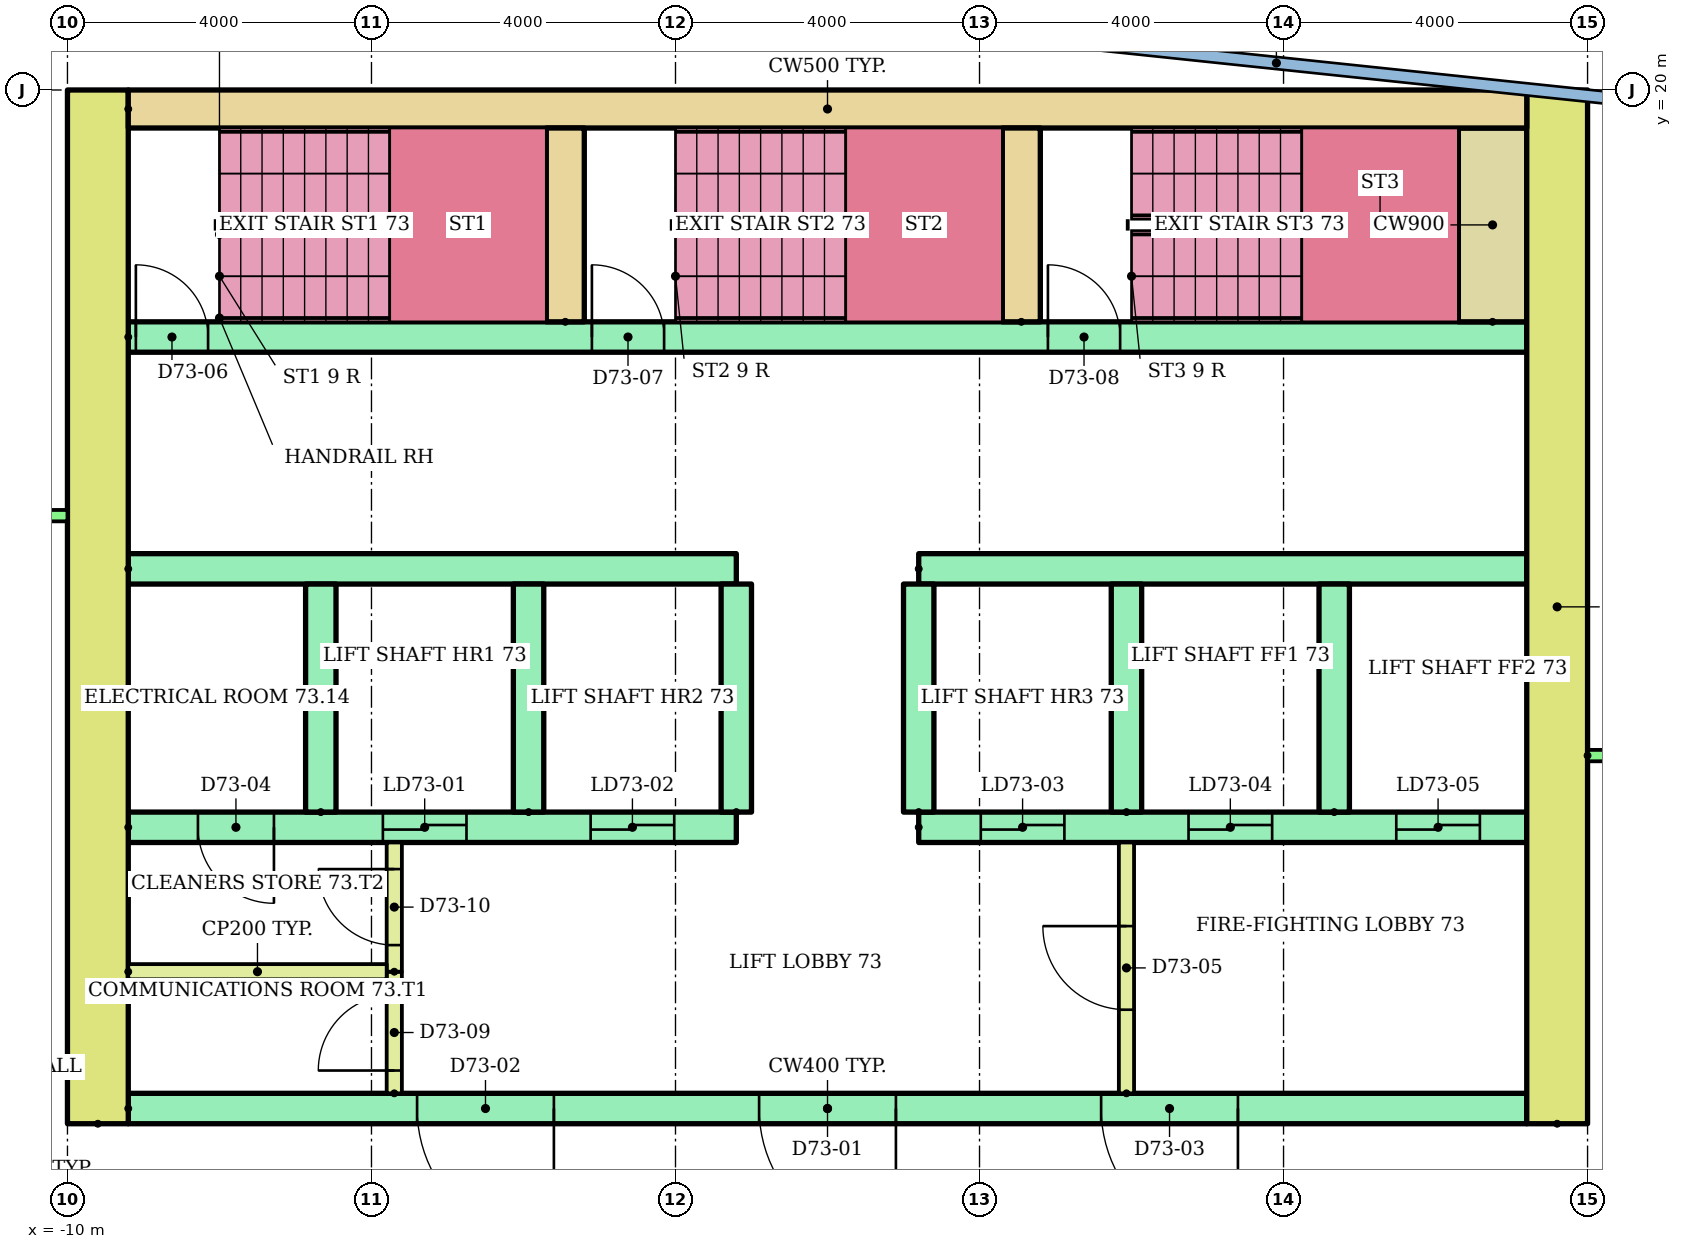
"""IFC4 building model, lengths in metres.
Left out: names, types, materials, properties, quantities, classifications, styles, units other than length and angle.
Written with IfcOpenShell. Run it as: python <this file> out.ifc"""

import sys

from ifc_helpers import new_model, si_unit, direction, frame, frame_2d, origin, place, context, subcontext, project, spatial, rectangle, extrude, element, fill, save


model = new_model("IFC4")
c1 = context("Model", 3, precision=1e-05, world=origin(), true_north=direction((0.0, 1.0)))
c2 = subcontext(c1, "Body", "Model", "MODEL_VIEW")
j1 = project(units=[si_unit("LENGTHUNIT", "METRE"), si_unit("PLANEANGLEUNIT", "RADIAN")], contexts=[c1])
p1 = place(None, origin())
s1 = spatial("IfcSite", under=j1, at=p1, CompositionType="ELEMENT")
p2 = place(p1, origin())
s2 = spatial("IfcBuilding", under=s1, at=p2, CompositionType="ELEMENT")
p3 = place(p2, frame((0.0, 0.0, 278.7)))
s3 = spatial("IfcBuildingStorey", under=s2, at=p3, CompositionType="ELEMENT", Elevation=278.7)
for number, where, z_axis, x_axis in (
    (1, (-9.6, 6.4, 0.0), (0.0, 0.0, 1.0), (0.0, 1.0, 0.0)),
    (2, (9.6, 6.4, 0.0), (0.0, 0.0, 1.0), (0.0, 1.0, 0.0)),
):
    element("IfcWall", number, at=place(p3, frame(where, z_axis=z_axis, x_axis=x_axis)), inside=s3, PredefinedType="SHEAR", context=c2, shape_type="SweptSolid", body=[
        extrude(rectangle(XDim=13.6, YDim=0.8, at=frame_2d((6.8, 0.0))), origin(), (0.0, 0.0, 1.0), 2.8),
    ])
p4 = place(p3, frame((-9.2, 19.75, 0.0)))
e3 = element("IfcWall", 3, at=p4, inside=s3, PredefinedType="SHEAR", context=c2, shape_type="SweptSolid", body=[
    extrude(rectangle(XDim=18.4, YDim=0.5, at=frame_2d((9.2, 0.0))), origin(), (0.0, 0.0, 1.0), 2.8),
])
p5 = place(p3, frame((-9.2, 6.6, 0.0)))
e4 = element("IfcWall", 4, at=p5, inside=s3, PredefinedType="SHEAR", context=c2, shape_type="SweptSolid", body=[
    extrude(rectangle(XDim=18.4, YDim=0.4, at=frame_2d((9.2, 0.0))), origin(), (0.0, 0.0, 1.0), 2.8),
])
p6 = place(p5, frame((8.3, 0.0, 0.0)))
e5 = element("IfcOpeningElement", 5, at=p6, cuts=e4, PredefinedType="OPENING", context=c2, shape_type="SweptSolid", body=[
    extrude(rectangle(XDim=1.8, YDim=2.1, at=frame_2d((0.9, 1.05))), frame((0.0, 0.21, 0.0), z_axis=(0.0, -1.0, 0.0), x_axis=(1.0, 0.0, 0.0)), (0.0, 0.0, 1.0), 0.42),
])
p7 = place(p5, frame((3.8, 0.0, 0.0)))
e6 = element("IfcOpeningElement", 6, at=p7, cuts=e4, PredefinedType="OPENING", context=c2, shape_type="SweptSolid", body=[
    extrude(rectangle(XDim=1.8, YDim=2.1, at=frame_2d((0.9, 1.05))), frame((0.0, 0.21, 0.0), z_axis=(0.0, -1.0, 0.0), x_axis=(1.0, 0.0, 0.0)), (0.0, 0.0, 1.0), 0.42),
])
p8 = place(p5, frame((12.8, 0.0, 0.0)))
e7 = element("IfcOpeningElement", 7, at=p8, cuts=e4, PredefinedType="OPENING", context=c2, shape_type="SweptSolid", body=[
    extrude(rectangle(XDim=1.8, YDim=2.1, at=frame_2d((0.9, 1.05))), frame((0.0, 0.21, 0.0), z_axis=(0.0, -1.0, 0.0), x_axis=(1.0, 0.0, 0.0)), (0.0, 0.0, 1.0), 0.42),
])
p9 = place(p3, frame((-9.2, 10.3, 0.0)))
e8 = element("IfcWall", 8, at=p9, inside=s3, PredefinedType="SHEAR", context=c2, shape_type="SweptSolid", body=[
    extrude(rectangle(XDim=8.0, YDim=0.4, at=frame_2d((4.0, 0.0))), origin(), (0.0, 0.0, 1.0), 2.8),
])
p10 = place(p9, frame((3.35, 0.0, 0.0)))
e9 = element("IfcOpeningElement", 9, at=p10, cuts=e8, PredefinedType="OPENING", context=c2, shape_type="SweptSolid", body=[
    extrude(rectangle(XDim=1.1, YDim=2.1, at=frame_2d((0.55, 1.05))), frame((0.0, 0.21, 0.0), z_axis=(0.0, -1.0, 0.0), x_axis=(1.0, 0.0, 0.0)), (0.0, 0.0, 1.0), 0.42),
])
p11 = place(p9, frame((6.083, 0.0, 0.0)))
e10 = element("IfcOpeningElement", 10, at=p11, cuts=e8, PredefinedType="OPENING", context=c2, shape_type="SweptSolid", body=[
    extrude(rectangle(XDim=1.1, YDim=2.1, at=frame_2d((0.55, 1.05))), frame((0.0, 0.21, 0.0), z_axis=(0.0, -1.0, 0.0), x_axis=(1.0, 0.0, 0.0)), (0.0, 0.0, 1.0), 0.42),
])
p12 = place(p9, frame((0.917, 0.0, 0.0)))
e11 = element("IfcOpeningElement", 11, at=p12, cuts=e8, PredefinedType="OPENING", context=c2, shape_type="SweptSolid", body=[
    extrude(rectangle(XDim=1.0, YDim=2.1, at=frame_2d((0.5, 1.05))), frame((0.0, 0.21, 0.0), z_axis=(0.0, -1.0, 0.0), x_axis=(1.0, 0.0, 0.0)), (0.0, 0.0, 1.0), 0.42),
])
p13 = place(p3, frame((-9.2, 13.7, 0.0)))
e12 = element("IfcWall", 12, at=p13, inside=s3, PredefinedType="SHEAR", context=c2, shape_type="SweptSolid", body=[
    extrude(rectangle(XDim=8.0, YDim=0.4, at=frame_2d((4.0, 0.0))), origin(), (0.0, 0.0, 1.0), 2.8),
])
p14 = place(p3, frame((1.2, 10.3, 0.0)))
e13 = element("IfcWall", 13, at=p14, inside=s3, PredefinedType="SHEAR", context=c2, shape_type="SweptSolid", body=[
    extrude(rectangle(XDim=8.0, YDim=0.4, at=frame_2d((4.0, 0.0))), origin(), (0.0, 0.0, 1.0), 2.8),
])
p15 = place(p14, frame((0.817, 0.0, 0.0)))
e14 = element("IfcOpeningElement", 14, at=p15, cuts=e13, PredefinedType="OPENING", context=c2, shape_type="SweptSolid", body=[
    extrude(rectangle(XDim=1.1, YDim=2.1, at=frame_2d((0.55, 1.05))), frame((0.0, 0.21, 0.0), z_axis=(0.0, -1.0, 0.0), x_axis=(1.0, 0.0, 0.0)), (0.0, 0.0, 1.0), 0.42),
])
p16 = place(p14, frame((3.55, 0.0, 0.0)))
e15 = element("IfcOpeningElement", 15, at=p16, cuts=e13, PredefinedType="OPENING", context=c2, shape_type="SweptSolid", body=[
    extrude(rectangle(XDim=1.1, YDim=2.1, at=frame_2d((0.55, 1.05))), frame((0.0, 0.21, 0.0), z_axis=(0.0, -1.0, 0.0), x_axis=(1.0, 0.0, 0.0)), (0.0, 0.0, 1.0), 0.42),
])
p17 = place(p14, frame((6.283, 0.0, 0.0)))
e16 = element("IfcOpeningElement", 16, at=p17, cuts=e13, PredefinedType="OPENING", context=c2, shape_type="SweptSolid", body=[
    extrude(rectangle(XDim=1.1, YDim=2.1, at=frame_2d((0.55, 1.05))), frame((0.0, 0.21, 0.0), z_axis=(0.0, -1.0, 0.0), x_axis=(1.0, 0.0, 0.0)), (0.0, 0.0, 1.0), 0.42),
])
p18 = place(p3, frame((1.2, 13.7, 0.0)))
e17 = element("IfcWall", 17, at=p18, inside=s3, PredefinedType="SHEAR", context=c2, shape_type="SweptSolid", body=[
    extrude(rectangle(XDim=8.0, YDim=0.4, at=frame_2d((4.0, 0.0))), origin(), (0.0, 0.0, 1.0), 2.8),
])
for number, where, z_axis, x_axis in (
    (18, (-6.667, 10.5, 0.0), (0.0, 0.0, 1.0), (0.0, 1.0, 0.0)),
    (19, (-3.933, 10.5, 0.0), (0.0, 0.0, 1.0), (0.0, 1.0, 0.0)),
    (20, (-1.2, 10.5, 0.0), (0.0, 0.0, 1.0), (0.0, 1.0, 0.0)),
    (21, (1.2, 10.5, 0.0), (0.0, 0.0, 1.0), (0.0, 1.0, 0.0)),
    (22, (3.933, 10.5, 0.0), (0.0, 0.0, 1.0), (0.0, 1.0, 0.0)),
    (23, (6.667, 10.5, 0.0), (0.0, 0.0, 1.0), (0.0, 1.0, 0.0)),
):
    element("IfcWall", number, at=place(p3, frame(where, z_axis=z_axis, x_axis=x_axis)), inside=s3, PredefinedType="SHEAR", context=c2, shape_type="SweptSolid", body=[
        extrude(rectangle(XDim=3.0, YDim=0.4, at=frame_2d((1.5, 0.0))), origin(), (0.0, 0.0, 1.0), 2.8),
    ])
p19 = place(p3, frame((3.933, 6.8, 0.0), z_axis=(0.0, 0.0, 1.0), x_axis=(0.0, 1.0, 0.0)))
e24 = element("IfcWall", 24, at=p19, inside=s3, PredefinedType="PARTITIONING", context=c2, shape_type="SweptSolid", body=[
    extrude(rectangle(XDim=3.3, YDim=0.2, at=frame_2d((1.65, 0.0))), origin(), (0.0, 0.0, 1.0), 2.8),
])
p20 = place(p19, frame((1.1, 0.0, 0.0)))
e25 = element("IfcOpeningElement", 25, at=p20, cuts=e24, PredefinedType="OPENING", context=c2, shape_type="SweptSolid", body=[
    extrude(rectangle(XDim=1.1, YDim=2.1, at=frame_2d((0.55, 1.05))), frame((0.0, 0.11, 0.0), z_axis=(0.0, -1.0, 0.0), x_axis=(1.0, 0.0, 0.0)), (0.0, 0.0, 1.0), 0.22),
])
p21 = place(p3, frame((-9.2, 16.75, 0.0)))
e26 = element("IfcWall", 26, at=p21, inside=s3, PredefinedType="SHEAR", context=c2, shape_type="SweptSolid", body=[
    extrude(rectangle(XDim=18.4, YDim=0.4, at=frame_2d((9.2, 0.0))), origin(), (0.0, 0.0, 1.0), 2.8),
])
p22 = place(p21, frame((0.1, 0.0, 0.0)))
e27 = element("IfcOpeningElement", 27, at=p22, cuts=e26, PredefinedType="OPENING", context=c2, shape_type="SweptSolid", body=[
    extrude(rectangle(XDim=0.95, YDim=2.1, at=frame_2d((0.475, 1.05))), frame((0.0, 0.21, 0.0), z_axis=(0.0, -1.0, 0.0), x_axis=(1.0, 0.0, 0.0)), (0.0, 0.0, 1.0), 0.42),
])
p23 = place(p21, frame((6.1, 0.0, 0.0)))
e28 = element("IfcOpeningElement", 28, at=p23, cuts=e26, PredefinedType="OPENING", context=c2, shape_type="SweptSolid", body=[
    extrude(rectangle(XDim=0.95, YDim=2.1, at=frame_2d((0.475, 1.05))), frame((0.0, 0.21, 0.0), z_axis=(0.0, -1.0, 0.0), x_axis=(1.0, 0.0, 0.0)), (0.0, 0.0, 1.0), 0.42),
])
p24 = place(p21, frame((12.1, 0.0, 0.0)))
e29 = element("IfcOpeningElement", 29, at=p24, cuts=e26, PredefinedType="OPENING", context=c2, shape_type="SweptSolid", body=[
    extrude(rectangle(XDim=0.95, YDim=2.1, at=frame_2d((0.475, 1.05))), frame((0.0, 0.21, 0.0), z_axis=(0.0, -1.0, 0.0), x_axis=(1.0, 0.0, 0.0)), (0.0, 0.0, 1.0), 0.42),
])
for number, where, z_axis, x_axis in (
    (30, (-3.45, 16.95, 0.0), (0.0, 0.0, 1.0), (0.0, 1.0, 0.0)),
    (31, (2.55, 16.95, 0.0), (0.0, 0.0, 1.0), (0.0, 1.0, 0.0)),
):
    element("IfcWall", number, at=place(p3, frame(where, z_axis=z_axis, x_axis=x_axis)), inside=s3, PredefinedType="SHEAR", context=c2, shape_type="SweptSolid", body=[
        extrude(rectangle(XDim=2.55, YDim=0.5, at=frame_2d((1.275, 0.0))), origin(), (0.0, 0.0, 1.0), 2.8),
    ])
p25 = place(p3, frame((8.75, 16.95, 0.0), z_axis=(0.0, 0.0, 1.0), x_axis=(0.0, 1.0, 0.0)))
e32 = element("IfcWall", 32, at=p25, inside=s3, PredefinedType="SHEAR", context=c2, shape_type="SweptSolid", body=[
    extrude(rectangle(XDim=2.55, YDim=0.9, at=frame_2d((1.275, 0.0))), origin(), (0.0, 0.0, 1.0), 2.8),
])
p26 = place(p3, frame((-5.7, 6.8, 0.0), z_axis=(0.0, 0.0, 1.0), x_axis=(0.0, 1.0, 0.0)))
e33 = element("IfcWall", 33, at=p26, inside=s3, PredefinedType="PARTITIONING", context=c2, shape_type="SweptSolid", body=[
    extrude(rectangle(XDim=1.6, YDim=0.2, at=frame_2d((0.8, 0.0))), origin(), (0.0, 0.0, 1.0), 2.8),
])
p27 = place(p26, frame((0.3, 0.0, 0.0)))
e34 = element("IfcOpeningElement", 34, at=p27, cuts=e33, PredefinedType="OPENING", context=c2, shape_type="SweptSolid", body=[
    extrude(rectangle(XDim=1.0, YDim=2.1, at=frame_2d((0.5, 1.05))), frame((0.0, 0.11, 0.0), z_axis=(0.0, -1.0, 0.0), x_axis=(1.0, 0.0, 0.0)), (0.0, 0.0, 1.0), 0.22),
])
p28 = place(p3, frame((-5.7, 8.4, 0.0), z_axis=(0.0, 0.0, 1.0), x_axis=(0.0, 1.0, 0.0)))
e35 = element("IfcWall", 35, at=p28, inside=s3, PredefinedType="PARTITIONING", context=c2, shape_type="SweptSolid", body=[
    extrude(rectangle(XDim=1.7, YDim=0.2, at=frame_2d((0.85, 0.0))), origin(), (0.0, 0.0, 1.0), 2.8),
])
p29 = place(p28, frame((0.35, 0.0, 0.0)))
e36 = element("IfcOpeningElement", 36, at=p29, cuts=e35, PredefinedType="OPENING", context=c2, shape_type="SweptSolid", body=[
    extrude(rectangle(XDim=1.0, YDim=2.1, at=frame_2d((0.5, 1.05))), frame((0.0, 0.11, 0.0), z_axis=(0.0, -1.0, 0.0), x_axis=(1.0, 0.0, 0.0)), (0.0, 0.0, 1.0), 0.22),
])
p30 = place(p3, frame((-9.2, 8.4, 0.0)))
e37 = element("IfcWall", 37, at=p30, inside=s3, PredefinedType="PARTITIONING", context=c2, shape_type="SweptSolid", body=[
    extrude(rectangle(XDim=3.4, YDim=0.2, at=frame_2d((1.7, 0.0))), origin(), (0.0, 0.0, 1.0), 2.8),
])
p31 = place(p3, frame((-21.89, 14.4, 0.0)))
e38 = element("IfcWall", 38, at=p31, inside=s3, PredefinedType="PARTITIONING", context=c2, shape_type="SweptSolid", body=[
    extrude(rectangle(XDim=11.89, YDim=0.15, at=frame_2d((5.945, 0.0))), origin(), (0.0, 0.0, 1.0), 2.4),
])
p32 = place(p31, frame((1.26, 0.0, 0.0)))
e39 = element("IfcOpeningElement", 39, at=p32, cuts=e38, PredefinedType="OPENING", context=c2, shape_type="SweptSolid", body=[
    extrude(rectangle(XDim=1.0, YDim=2.1, at=frame_2d((0.5, 1.05))), frame((0.0, 0.085, 0.0), z_axis=(0.0, -1.0, 0.0), x_axis=(1.0, 0.0, 0.0)), (0.0, 0.0, 1.0), 0.17),
])
p33 = place(p31, frame((8.254, 0.0, 0.0)))
e40 = element("IfcOpeningElement", 40, at=p33, cuts=e38, PredefinedType="OPENING", context=c2, shape_type="SweptSolid", body=[
    extrude(rectangle(XDim=1.0, YDim=2.1, at=frame_2d((0.5, 1.05))), frame((0.0, 0.085, 0.0), z_axis=(0.0, -1.0, 0.0), x_axis=(1.0, 0.0, 0.0)), (0.0, 0.0, 1.0), 0.17),
])
p34 = place(p3, frame((10.0, 11.243, 0.0)))
e41 = element("IfcWall", 41, at=p34, inside=s3, PredefinedType="PARTITIONING", context=c2, shape_type="SweptSolid", body=[
    extrude(rectangle(XDim=22.118, YDim=0.15, at=frame_2d((11.059, 0.0))), origin(), (0.0, 0.0, 1.0), 2.4),
])
p35 = place(p34, frame((7.398, 0.0, 0.0)))
e42 = element("IfcOpeningElement", 42, at=p35, cuts=e41, PredefinedType="OPENING", context=c2, shape_type="SweptSolid", body=[
    extrude(rectangle(XDim=1.0, YDim=2.1, at=frame_2d((0.5, 1.05))), frame((0.0, 0.085, 0.0), z_axis=(0.0, -1.0, 0.0), x_axis=(1.0, 0.0, 0.0)), (0.0, 0.0, 1.0), 0.17),
])
p36 = place(p34, frame((18.477, 0.0, 0.0)))
e43 = element("IfcOpeningElement", 43, at=p36, cuts=e41, PredefinedType="OPENING", context=c2, shape_type="SweptSolid", body=[
    extrude(rectangle(XDim=0.9, YDim=2.1, at=frame_2d((0.45, 1.05))), frame((0.0, 0.085, 0.0), z_axis=(0.0, -1.0, 0.0), x_axis=(1.0, 0.0, 0.0)), (0.0, 0.0, 1.0), 0.17),
])
p37 = place(p6, frame((1.8, 0.0, 0.0), z_axis=(0.0, 0.0, 1.0), x_axis=(-1.0, 0.0, 0.0)))
e44 = element("IfcDoor", 44, at=p37, inside=s3, OperationType="DOUBLE_DOOR_SINGLE_SWING", PredefinedType="DOOR", context=c2, shape_type="SweptSolid", body=[
    extrude(rectangle(XDim=1.8, YDim=2.1, at=frame_2d((0.9, 1.05))), frame((0.0, 0.025, 0.0), z_axis=(0.0, -1.0, 0.0), x_axis=(1.0, 0.0, 0.0)), (0.0, 0.0, 1.0), 0.05),
])
fill(e5, e44)
p38 = place(p7, frame((1.8, 0.0, 0.0), z_axis=(0.0, 0.0, 1.0), x_axis=(-1.0, 0.0, 0.0)))
e45 = element("IfcDoor", 45, at=p38, inside=s3, OperationType="DOUBLE_DOOR_SINGLE_SWING", PredefinedType="DOOR", context=c2, shape_type="SweptSolid", body=[
    extrude(rectangle(XDim=1.8, YDim=2.1, at=frame_2d((0.9, 1.05))), frame((0.0, 0.025, 0.0), z_axis=(0.0, -1.0, 0.0), x_axis=(1.0, 0.0, 0.0)), (0.0, 0.0, 1.0), 0.05),
])
fill(e6, e45)
p39 = place(p8, frame((1.8, 0.0, 0.0), z_axis=(0.0, 0.0, 1.0), x_axis=(-1.0, 0.0, 0.0)))
e46 = element("IfcDoor", 46, at=p39, inside=s3, OperationType="DOUBLE_DOOR_SINGLE_SWING", PredefinedType="DOOR", context=c2, shape_type="SweptSolid", body=[
    extrude(rectangle(XDim=1.8, YDim=2.1, at=frame_2d((0.9, 1.05))), frame((0.0, 0.025, 0.0), z_axis=(0.0, -1.0, 0.0), x_axis=(1.0, 0.0, 0.0)), (0.0, 0.0, 1.0), 0.05),
])
fill(e7, e46)
p40 = place(p10, origin())
e47 = element("IfcDoor", 47, at=p40, inside=s3, OperationType="SLIDING_TO_LEFT", PredefinedType="DOOR", context=c2, shape_type="SweptSolid", body=[
    extrude(rectangle(XDim=1.1, YDim=2.1, at=frame_2d((0.55, 1.05))), frame((0.0, 0.025, 0.0), z_axis=(0.0, -1.0, 0.0), x_axis=(1.0, 0.0, 0.0)), (0.0, 0.0, 1.0), 0.05),
])
fill(e9, e47)
p41 = place(p11, origin())
e48 = element("IfcDoor", 48, at=p41, inside=s3, OperationType="SLIDING_TO_LEFT", PredefinedType="DOOR", context=c2, shape_type="SweptSolid", body=[
    extrude(rectangle(XDim=1.1, YDim=2.1, at=frame_2d((0.55, 1.05))), frame((0.0, 0.025, 0.0), z_axis=(0.0, -1.0, 0.0), x_axis=(1.0, 0.0, 0.0)), (0.0, 0.0, 1.0), 0.05),
])
fill(e10, e48)
p42 = place(p15, origin())
e49 = element("IfcDoor", 49, at=p42, inside=s3, OperationType="SLIDING_TO_LEFT", PredefinedType="DOOR", context=c2, shape_type="SweptSolid", body=[
    extrude(rectangle(XDim=1.1, YDim=2.1, at=frame_2d((0.55, 1.05))), frame((0.0, 0.025, 0.0), z_axis=(0.0, -1.0, 0.0), x_axis=(1.0, 0.0, 0.0)), (0.0, 0.0, 1.0), 0.05),
])
fill(e14, e49)
p43 = place(p16, origin())
e50 = element("IfcDoor", 50, at=p43, inside=s3, OperationType="SLIDING_TO_LEFT", PredefinedType="DOOR", context=c2, shape_type="SweptSolid", body=[
    extrude(rectangle(XDim=1.1, YDim=2.1, at=frame_2d((0.55, 1.05))), frame((0.0, 0.025, 0.0), z_axis=(0.0, -1.0, 0.0), x_axis=(1.0, 0.0, 0.0)), (0.0, 0.0, 1.0), 0.05),
])
fill(e15, e50)
p44 = place(p17, origin())
e51 = element("IfcDoor", 51, at=p44, inside=s3, OperationType="SLIDING_TO_LEFT", PredefinedType="DOOR", context=c2, shape_type="SweptSolid", body=[
    extrude(rectangle(XDim=1.1, YDim=2.1, at=frame_2d((0.55, 1.05))), frame((0.0, 0.025, 0.0), z_axis=(0.0, -1.0, 0.0), x_axis=(1.0, 0.0, 0.0)), (0.0, 0.0, 1.0), 0.05),
])
fill(e16, e51)
p45 = place(p12, frame((1.0, 0.0, 0.0), z_axis=(0.0, 0.0, 1.0), x_axis=(-1.0, 0.0, 0.0)))
e52 = element("IfcDoor", 52, at=p45, inside=s3, OperationType="SINGLE_SWING_RIGHT", PredefinedType="DOOR", context=c2, shape_type="SweptSolid", body=[
    extrude(rectangle(XDim=1.0, YDim=2.1, at=frame_2d((0.5, 1.05))), frame((0.0, 0.025, 0.0), z_axis=(0.0, -1.0, 0.0), x_axis=(1.0, 0.0, 0.0)), (0.0, 0.0, 1.0), 0.05),
])
fill(e11, e52)
p46 = place(p20, origin())
e53 = element("IfcDoor", 53, at=p46, inside=s3, OperationType="SINGLE_SWING_RIGHT", PredefinedType="DOOR", context=c2, shape_type="SweptSolid", body=[
    extrude(rectangle(XDim=1.1, YDim=2.1, at=frame_2d((0.55, 1.05))), frame((0.0, 0.025, 0.0), z_axis=(0.0, -1.0, 0.0), x_axis=(1.0, 0.0, 0.0)), (0.0, 0.0, 1.0), 0.05),
])
fill(e25, e53)
p47 = place(p22, origin())
e54 = element("IfcDoor", 54, at=p47, inside=s3, OperationType="SINGLE_SWING_LEFT", PredefinedType="DOOR", context=c2, shape_type="SweptSolid", body=[
    extrude(rectangle(XDim=0.95, YDim=2.1, at=frame_2d((0.475, 1.05))), frame((0.0, 0.025, 0.0), z_axis=(0.0, -1.0, 0.0), x_axis=(1.0, 0.0, 0.0)), (0.0, 0.0, 1.0), 0.05),
])
fill(e27, e54)
p48 = place(p23, origin())
e55 = element("IfcDoor", 55, at=p48, inside=s3, OperationType="SINGLE_SWING_LEFT", PredefinedType="DOOR", context=c2, shape_type="SweptSolid", body=[
    extrude(rectangle(XDim=0.95, YDim=2.1, at=frame_2d((0.475, 1.05))), frame((0.0, 0.025, 0.0), z_axis=(0.0, -1.0, 0.0), x_axis=(1.0, 0.0, 0.0)), (0.0, 0.0, 1.0), 0.05),
])
fill(e28, e55)
p49 = place(p24, origin())
e56 = element("IfcDoor", 56, at=p49, inside=s3, OperationType="SINGLE_SWING_LEFT", PredefinedType="DOOR", context=c2, shape_type="SweptSolid", body=[
    extrude(rectangle(XDim=0.95, YDim=2.1, at=frame_2d((0.475, 1.05))), frame((0.0, 0.025, 0.0), z_axis=(0.0, -1.0, 0.0), x_axis=(1.0, 0.0, 0.0)), (0.0, 0.0, 1.0), 0.05),
])
fill(e29, e56)
p50 = place(p27, origin())
e57 = element("IfcDoor", 57, at=p50, inside=s3, OperationType="SINGLE_SWING_LEFT", PredefinedType="DOOR", context=c2, shape_type="SweptSolid", body=[
    extrude(rectangle(XDim=1.0, YDim=2.1, at=frame_2d((0.5, 1.05))), frame((0.0, 0.025, 0.0), z_axis=(0.0, -1.0, 0.0), x_axis=(1.0, 0.0, 0.0)), (0.0, 0.0, 1.0), 0.05),
])
fill(e34, e57)
p51 = place(p29, origin())
e58 = element("IfcDoor", 58, at=p51, inside=s3, OperationType="SINGLE_SWING_RIGHT", PredefinedType="DOOR", context=c2, shape_type="SweptSolid", body=[
    extrude(rectangle(XDim=1.0, YDim=2.1, at=frame_2d((0.5, 1.05))), frame((0.0, 0.025, 0.0), z_axis=(0.0, -1.0, 0.0), x_axis=(1.0, 0.0, 0.0)), (0.0, 0.0, 1.0), 0.05),
])
fill(e36, e58)
save(model, sys.argv[1])
